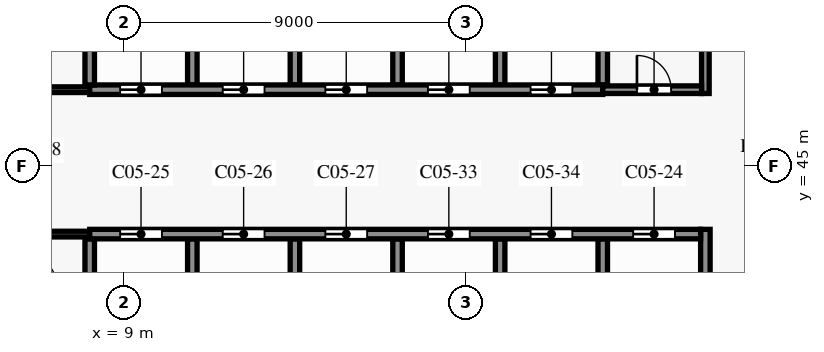
"""IFC4 building model, lengths in metres.
Left out: names, types, materials, properties, quantities, classifications, styles, units other than length and angle.
Written with IfcOpenShell. Run it as: python <this file> out.ifc"""

import sys

from ifc_helpers import new_model, si_unit, direction, frame, frame_2d, origin, place, context, subcontext, project, spatial, rectangle, extrude, element, fill, save


model = new_model("IFC4")
c1 = context("Model", 3, precision=1e-05, world=origin(), true_north=direction((0.0, 1.0)))
c2 = subcontext(c1, "Body", "Model", "MODEL_VIEW")
j1 = project(units=[si_unit("LENGTHUNIT", "METRE"), si_unit("PLANEANGLEUNIT", "RADIAN")], contexts=[c1])
p1 = place(None, origin())
s1 = spatial("IfcSite", under=j1, at=p1, CompositionType="ELEMENT")
p2 = place(p1, origin())
s2 = spatial("IfcBuilding", under=s1, at=p2, CompositionType="ELEMENT")
p3 = place(p2, frame((0.0, 0.0, 19.5)))
s3 = spatial("IfcBuildingStorey", under=s2, at=p3, CompositionType="ELEMENT", Elevation=19.5)
p4 = place(p3, frame((0.15, 43.2, 0.0), z_axis=(0.0, 0.0, 1.0), x_axis=(1.0, 0.0, 0.0)))
e1 = element("IfcWall", 1, at=p4, inside=s3, PredefinedType="PARTITIONING", context=c2, shape_type="SweptSolid", body=[
    extrude(rectangle(XDim=7.95, YDim=0.15, at=frame_2d((3.975, 0.0))), origin(), (0.0, 0.0, 1.0), 7.7),
])
p5 = place(p4, frame((2.25, 0.0, 0.0)))
e2 = element("IfcOpeningElement", 2, at=p5, cuts=e1, PredefinedType="OPENING", context=c2, shape_type="SweptSolid", body=[
    extrude(rectangle(XDim=0.9, YDim=2.1, at=frame_2d((0.45, 1.05))), frame((0.0, 0.085, 0.0), z_axis=(0.0, -1.0, 0.0), x_axis=(1.0, 0.0, 0.0)), (0.0, 0.0, 1.0), 0.17),
])
p6 = place(p4, frame((5.975, 0.0, 0.0)))
e3 = element("IfcOpeningElement", 3, at=p6, cuts=e1, PredefinedType="OPENING", context=c2, shape_type="SweptSolid", body=[
    extrude(rectangle(XDim=0.9, YDim=2.1, at=frame_2d((0.45, 1.05))), frame((0.0, 0.085, 0.0), z_axis=(0.0, -1.0, 0.0), x_axis=(1.0, 0.0, 0.0)), (0.0, 0.0, 1.0), 0.17),
])
p7 = place(p3, frame((8.1, 43.2, 0.0), z_axis=(0.0, 0.0, 1.0), x_axis=(1.0, 0.0, 0.0)))
e4 = element("IfcWall", 4, at=p7, inside=s3, PredefinedType="SHEAR", context=c2, shape_type="SweptSolid", body=[
    extrude(rectangle(XDim=16.075, YDim=0.25, at=frame_2d((8.038, 0.0))), origin(), (0.0, 0.0, 1.0), 7.7),
])
p8 = place(p7, frame((14.3, 0.0, 0.0)))
e5 = element("IfcOpeningElement", 5, at=p8, cuts=e4, PredefinedType="OPENING", context=c2, shape_type="SweptSolid", body=[
    extrude(rectangle(XDim=1.1, YDim=2.1, at=frame_2d((0.55, 1.05))), frame((0.0, 0.135, 0.0), z_axis=(0.0, -1.0, 0.0), x_axis=(1.0, 0.0, 0.0)), (0.0, 0.0, 1.0), 0.27),
])
p9 = place(p7, frame((0.8, 0.0, 0.0)))
e6 = element("IfcOpeningElement", 6, at=p9, cuts=e4, PredefinedType="OPENING", context=c2, shape_type="SweptSolid", body=[
    extrude(rectangle(XDim=1.1, YDim=2.1, at=frame_2d((0.55, 1.05))), frame((0.0, 0.135, 0.0), z_axis=(0.0, -1.0, 0.0), x_axis=(1.0, 0.0, 0.0)), (0.0, 0.0, 1.0), 0.27),
])
p10 = place(p7, frame((3.5, 0.0, 0.0)))
e7 = element("IfcOpeningElement", 7, at=p10, cuts=e4, PredefinedType="OPENING", context=c2, shape_type="SweptSolid", body=[
    extrude(rectangle(XDim=1.1, YDim=2.1, at=frame_2d((0.55, 1.05))), frame((0.0, 0.135, 0.0), z_axis=(0.0, -1.0, 0.0), x_axis=(1.0, 0.0, 0.0)), (0.0, 0.0, 1.0), 0.27),
])
p11 = place(p7, frame((6.2, 0.0, 0.0)))
e8 = element("IfcOpeningElement", 8, at=p11, cuts=e4, PredefinedType="OPENING", context=c2, shape_type="SweptSolid", body=[
    extrude(rectangle(XDim=1.1, YDim=2.1, at=frame_2d((0.55, 1.05))), frame((0.0, 0.135, 0.0), z_axis=(0.0, -1.0, 0.0), x_axis=(1.0, 0.0, 0.0)), (0.0, 0.0, 1.0), 0.27),
])
p12 = place(p7, frame((8.9, 0.0, 0.0)))
e9 = element("IfcOpeningElement", 9, at=p12, cuts=e4, PredefinedType="OPENING", context=c2, shape_type="SweptSolid", body=[
    extrude(rectangle(XDim=1.1, YDim=2.1, at=frame_2d((0.55, 1.05))), frame((0.0, 0.135, 0.0), z_axis=(0.0, -1.0, 0.0), x_axis=(1.0, 0.0, 0.0)), (0.0, 0.0, 1.0), 0.27),
])
p13 = place(p7, frame((11.6, 0.0, 0.0)))
e10 = element("IfcOpeningElement", 10, at=p13, cuts=e4, PredefinedType="OPENING", context=c2, shape_type="SweptSolid", body=[
    extrude(rectangle(XDim=1.1, YDim=2.1, at=frame_2d((0.55, 1.05))), frame((0.0, 0.135, 0.0), z_axis=(0.0, -1.0, 0.0), x_axis=(1.0, 0.0, 0.0)), (0.0, 0.0, 1.0), 0.27),
])
p14 = place(p3, frame((0.15, 47.0, 0.0), z_axis=(0.0, 0.0, 1.0), x_axis=(1.0, 0.0, 0.0)))
e11 = element("IfcWall", 11, at=p14, inside=s3, PredefinedType="PARTITIONING", context=c2, shape_type="SweptSolid", body=[
    extrude(rectangle(XDim=7.95, YDim=0.15, at=frame_2d((3.975, 0.0))), origin(), (0.0, 0.0, 1.0), 7.7),
])
p15 = place(p14, frame((2.25, 0.0, 0.0)))
e12 = element("IfcOpeningElement", 12, at=p15, cuts=e11, PredefinedType="OPENING", context=c2, shape_type="SweptSolid", body=[
    extrude(rectangle(XDim=0.9, YDim=2.1, at=frame_2d((0.45, 1.05))), frame((0.0, 0.085, 0.0), z_axis=(0.0, -1.0, 0.0), x_axis=(1.0, 0.0, 0.0)), (0.0, 0.0, 1.0), 0.17),
])
p16 = place(p14, frame((5.975, 0.0, 0.0)))
e13 = element("IfcOpeningElement", 13, at=p16, cuts=e11, PredefinedType="OPENING", context=c2, shape_type="SweptSolid", body=[
    extrude(rectangle(XDim=0.9, YDim=2.1, at=frame_2d((0.45, 1.05))), frame((0.0, 0.085, 0.0), z_axis=(0.0, -1.0, 0.0), x_axis=(1.0, 0.0, 0.0)), (0.0, 0.0, 1.0), 0.17),
])
p17 = place(p3, frame((21.6, 47.0, 0.0), z_axis=(0.0, 0.0, 1.0), x_axis=(1.0, 0.0, 0.0)))
e14 = element("IfcWall", 14, at=p17, inside=s3, PredefinedType="PARTITIONING", context=c2, shape_type="SweptSolid", body=[
    extrude(rectangle(XDim=2.6, YDim=0.2, at=frame_2d((1.3, 0.0))), origin(), (0.0, 0.0, 1.0), 7.7),
])
p18 = place(p17, frame((0.9, 0.0, 0.0)))
e15 = element("IfcOpeningElement", 15, at=p18, cuts=e14, PredefinedType="OPENING", context=c2, shape_type="SweptSolid", body=[
    extrude(rectangle(XDim=0.9, YDim=2.1, at=frame_2d((0.45, 1.05))), frame((0.0, 0.11, 0.0), z_axis=(0.0, -1.0, 0.0), x_axis=(1.0, 0.0, 0.0)), (0.0, 0.0, 1.0), 0.22),
])
p19 = place(p3, frame((8.1, 47.0, 0.0), z_axis=(0.0, 0.0, 1.0), x_axis=(1.0, 0.0, 0.0)))
e16 = element("IfcWall", 16, at=p19, inside=s3, PredefinedType="SHEAR", context=c2, shape_type="SweptSolid", body=[
    extrude(rectangle(XDim=13.5, YDim=0.25, at=frame_2d((6.75, 0.0))), origin(), (0.0, 0.0, 1.0), 7.7),
])
p20 = place(p19, frame((0.8, 0.0, 0.0)))
e17 = element("IfcOpeningElement", 17, at=p20, cuts=e16, PredefinedType="OPENING", context=c2, shape_type="SweptSolid", body=[
    extrude(rectangle(XDim=1.1, YDim=2.1, at=frame_2d((0.55, 1.05))), frame((0.0, 0.135, 0.0), z_axis=(0.0, -1.0, 0.0), x_axis=(1.0, 0.0, 0.0)), (0.0, 0.0, 1.0), 0.27),
])
p21 = place(p19, frame((3.5, 0.0, 0.0)))
e18 = element("IfcOpeningElement", 18, at=p21, cuts=e16, PredefinedType="OPENING", context=c2, shape_type="SweptSolid", body=[
    extrude(rectangle(XDim=1.1, YDim=2.1, at=frame_2d((0.55, 1.05))), frame((0.0, 0.135, 0.0), z_axis=(0.0, -1.0, 0.0), x_axis=(1.0, 0.0, 0.0)), (0.0, 0.0, 1.0), 0.27),
])
p22 = place(p19, frame((6.2, 0.0, 0.0)))
e19 = element("IfcOpeningElement", 19, at=p22, cuts=e16, PredefinedType="OPENING", context=c2, shape_type="SweptSolid", body=[
    extrude(rectangle(XDim=1.1, YDim=2.1, at=frame_2d((0.55, 1.05))), frame((0.0, 0.135, 0.0), z_axis=(0.0, -1.0, 0.0), x_axis=(1.0, 0.0, 0.0)), (0.0, 0.0, 1.0), 0.27),
])
p23 = place(p19, frame((8.9, 0.0, 0.0)))
e20 = element("IfcOpeningElement", 20, at=p23, cuts=e16, PredefinedType="OPENING", context=c2, shape_type="SweptSolid", body=[
    extrude(rectangle(XDim=1.1, YDim=2.1, at=frame_2d((0.55, 1.05))), frame((0.0, 0.135, 0.0), z_axis=(0.0, -1.0, 0.0), x_axis=(1.0, 0.0, 0.0)), (0.0, 0.0, 1.0), 0.27),
])
p24 = place(p19, frame((11.6, 0.0, 0.0)))
e21 = element("IfcOpeningElement", 21, at=p24, cuts=e16, PredefinedType="OPENING", context=c2, shape_type="SweptSolid", body=[
    extrude(rectangle(XDim=1.1, YDim=2.1, at=frame_2d((0.55, 1.05))), frame((0.0, 0.135, 0.0), z_axis=(0.0, -1.0, 0.0), x_axis=(1.0, 0.0, 0.0)), (0.0, 0.0, 1.0), 0.27),
])
for number, where, z_axis, x_axis in (
    (22, (8.1, 40.125, 0.0), (0.0, 0.0, 1.0), (0.0, 1.0, 0.0)),
    (23, (8.1, 47.125, 0.0), (0.0, 0.0, 1.0), (0.0, 1.0, 0.0)),
    (24, (10.8, 40.125, 0.0), (0.0, 0.0, 1.0), (0.0, 1.0, 0.0)),
    (25, (10.8, 47.125, 0.0), (0.0, 0.0, 1.0), (0.0, 1.0, 0.0)),
    (26, (13.5, 40.125, 0.0), (0.0, 0.0, 1.0), (0.0, 1.0, 0.0)),
    (27, (13.5, 47.125, 0.0), (0.0, 0.0, 1.0), (0.0, 1.0, 0.0)),
    (28, (16.2, 40.125, 0.0), (0.0, 0.0, 1.0), (0.0, 1.0, 0.0)),
    (29, (16.2, 47.125, 0.0), (0.0, 0.0, 1.0), (0.0, 1.0, 0.0)),
    (30, (18.9, 40.125, 0.0), (0.0, 0.0, 1.0), (0.0, 1.0, 0.0)),
    (31, (18.9, 47.125, 0.0), (0.0, 0.0, 1.0), (0.0, 1.0, 0.0)),
    (32, (21.6, 40.125, 0.0), (0.0, 0.0, 1.0), (0.0, 1.0, 0.0)),
):
    element("IfcWall", number, at=place(p3, frame(where, z_axis=z_axis, x_axis=x_axis)), inside=s3, PredefinedType="SHEAR", context=c2, shape_type="SweptSolid", body=[
        extrude(rectangle(XDim=2.95, YDim=0.25, at=frame_2d((1.475, 0.0))), origin(), (0.0, 0.0, 1.0), 7.7),
    ])
p25 = place(p3, frame((21.6, 47.125, 0.0), z_axis=(0.0, 0.0, 1.0), x_axis=(0.0, 1.0, 0.0)))
e33 = element("IfcWall", 33, at=p25, inside=s3, PredefinedType="SHEAR", context=c2, shape_type="SweptSolid", body=[
    extrude(rectangle(XDim=3.075, YDim=0.25, at=frame_2d((1.538, 0.0))), origin(), (0.0, 0.0, 1.0), 7.7),
])
p26 = place(p3, frame((24.3, 46.9, 0.0), z_axis=(0.0, 0.0, 1.0), x_axis=(0.0, 1.0, 0.0)))
e34 = element("IfcWall", 34, at=p26, inside=s3, PredefinedType="SHEAR", context=c2, shape_type="SweptSolid", body=[
    extrude(rectangle(XDim=5.0, YDim=0.2, at=frame_2d((2.5, 0.0))), origin(), (0.0, 0.0, 1.0), 7.7),
])
p27 = place(p3, frame((24.3, 40.0, 0.0), z_axis=(0.0, 0.0, 1.0), x_axis=(0.0, 1.0, 0.0)))
e35 = element("IfcWall", 35, at=p27, inside=s3, PredefinedType="SHEAR", context=c2, shape_type="SweptSolid", body=[
    extrude(rectangle(XDim=3.325, YDim=0.25, at=frame_2d((1.663, 0.0))), origin(), (0.0, 0.0, 1.0), 7.7),
])
p28 = place(p18, origin())
e36 = element("IfcDoor", 36, at=p28, inside=s3, OperationType="SINGLE_SWING_LEFT", PredefinedType="DOOR", context=c2, shape_type="SweptSolid", body=[
    extrude(rectangle(XDim=0.9, YDim=2.1, at=frame_2d((0.45, 1.05))), frame((0.0, 0.025, 0.0), z_axis=(0.0, -1.0, 0.0), x_axis=(1.0, 0.0, 0.0)), (0.0, 0.0, 1.0), 0.05),
])
fill(e15, e36)
p29 = place(p8, origin())
e37 = element("IfcDoor", 37, at=p29, inside=s3, OperationType="DOUBLE_DOOR_SLIDING", PredefinedType="DOOR", context=c2, shape_type="SweptSolid", body=[
    extrude(rectangle(XDim=1.1, YDim=2.1, at=frame_2d((0.55, 1.05))), frame((0.0, 0.025, 0.0), z_axis=(0.0, -1.0, 0.0), x_axis=(1.0, 0.0, 0.0)), (0.0, 0.0, 1.0), 0.05),
])
fill(e5, e37)
p30 = place(p9, origin())
e38 = element("IfcDoor", 38, at=p30, inside=s3, OperationType="DOUBLE_DOOR_SLIDING", PredefinedType="DOOR", context=c2, shape_type="SweptSolid", body=[
    extrude(rectangle(XDim=1.1, YDim=2.1, at=frame_2d((0.55, 1.05))), frame((0.0, 0.025, 0.0), z_axis=(0.0, -1.0, 0.0), x_axis=(1.0, 0.0, 0.0)), (0.0, 0.0, 1.0), 0.05),
])
fill(e6, e38)
p31 = place(p10, origin())
e39 = element("IfcDoor", 39, at=p31, inside=s3, OperationType="DOUBLE_DOOR_SLIDING", PredefinedType="DOOR", context=c2, shape_type="SweptSolid", body=[
    extrude(rectangle(XDim=1.1, YDim=2.1, at=frame_2d((0.55, 1.05))), frame((0.0, 0.025, 0.0), z_axis=(0.0, -1.0, 0.0), x_axis=(1.0, 0.0, 0.0)), (0.0, 0.0, 1.0), 0.05),
])
fill(e7, e39)
p32 = place(p11, origin())
e40 = element("IfcDoor", 40, at=p32, inside=s3, OperationType="DOUBLE_DOOR_SLIDING", PredefinedType="DOOR", context=c2, shape_type="SweptSolid", body=[
    extrude(rectangle(XDim=1.1, YDim=2.1, at=frame_2d((0.55, 1.05))), frame((0.0, 0.025, 0.0), z_axis=(0.0, -1.0, 0.0), x_axis=(1.0, 0.0, 0.0)), (0.0, 0.0, 1.0), 0.05),
])
fill(e8, e40)
p33 = place(p20, origin())
e41 = element("IfcDoor", 41, at=p33, inside=s3, OperationType="DOUBLE_DOOR_SLIDING", PredefinedType="DOOR", context=c2, shape_type="SweptSolid", body=[
    extrude(rectangle(XDim=1.1, YDim=2.1, at=frame_2d((0.55, 1.05))), frame((0.0, 0.025, 0.0), z_axis=(0.0, -1.0, 0.0), x_axis=(1.0, 0.0, 0.0)), (0.0, 0.0, 1.0), 0.05),
])
fill(e17, e41)
p34 = place(p21, origin())
e42 = element("IfcDoor", 42, at=p34, inside=s3, OperationType="DOUBLE_DOOR_SLIDING", PredefinedType="DOOR", context=c2, shape_type="SweptSolid", body=[
    extrude(rectangle(XDim=1.1, YDim=2.1, at=frame_2d((0.55, 1.05))), frame((0.0, 0.025, 0.0), z_axis=(0.0, -1.0, 0.0), x_axis=(1.0, 0.0, 0.0)), (0.0, 0.0, 1.0), 0.05),
])
fill(e18, e42)
p35 = place(p22, origin())
e43 = element("IfcDoor", 43, at=p35, inside=s3, OperationType="DOUBLE_DOOR_SLIDING", PredefinedType="DOOR", context=c2, shape_type="SweptSolid", body=[
    extrude(rectangle(XDim=1.1, YDim=2.1, at=frame_2d((0.55, 1.05))), frame((0.0, 0.025, 0.0), z_axis=(0.0, -1.0, 0.0), x_axis=(1.0, 0.0, 0.0)), (0.0, 0.0, 1.0), 0.05),
])
fill(e19, e43)
p36 = place(p23, origin())
e44 = element("IfcDoor", 44, at=p36, inside=s3, OperationType="DOUBLE_DOOR_SLIDING", PredefinedType="DOOR", context=c2, shape_type="SweptSolid", body=[
    extrude(rectangle(XDim=1.1, YDim=2.1, at=frame_2d((0.55, 1.05))), frame((0.0, 0.025, 0.0), z_axis=(0.0, -1.0, 0.0), x_axis=(1.0, 0.0, 0.0)), (0.0, 0.0, 1.0), 0.05),
])
fill(e20, e44)
p37 = place(p24, origin())
e45 = element("IfcDoor", 45, at=p37, inside=s3, OperationType="DOUBLE_DOOR_SLIDING", PredefinedType="DOOR", context=c2, shape_type="SweptSolid", body=[
    extrude(rectangle(XDim=1.1, YDim=2.1, at=frame_2d((0.55, 1.05))), frame((0.0, 0.025, 0.0), z_axis=(0.0, -1.0, 0.0), x_axis=(1.0, 0.0, 0.0)), (0.0, 0.0, 1.0), 0.05),
])
fill(e21, e45)
p38 = place(p12, origin())
e46 = element("IfcDoor", 46, at=p38, inside=s3, OperationType="DOUBLE_DOOR_SLIDING", PredefinedType="DOOR", context=c2, shape_type="SweptSolid", body=[
    extrude(rectangle(XDim=1.1, YDim=2.1, at=frame_2d((0.55, 1.05))), frame((0.0, 0.025, 0.0), z_axis=(0.0, -1.0, 0.0), x_axis=(1.0, 0.0, 0.0)), (0.0, 0.0, 1.0), 0.05),
])
fill(e9, e46)
p39 = place(p13, origin())
e47 = element("IfcDoor", 47, at=p39, inside=s3, OperationType="DOUBLE_DOOR_SLIDING", PredefinedType="DOOR", context=c2, shape_type="SweptSolid", body=[
    extrude(rectangle(XDim=1.1, YDim=2.1, at=frame_2d((0.55, 1.05))), frame((0.0, 0.025, 0.0), z_axis=(0.0, -1.0, 0.0), x_axis=(1.0, 0.0, 0.0)), (0.0, 0.0, 1.0), 0.05),
])
fill(e10, e47)
save(model, sys.argv[1])
